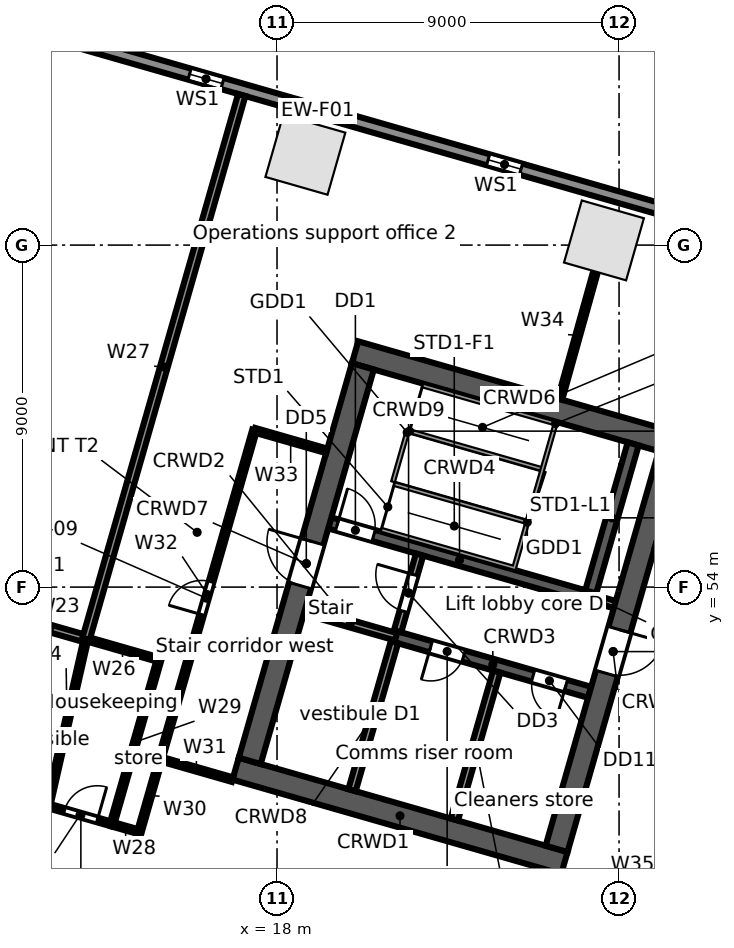
"""IFC4 building model, lengths in metres.
Left out: names, types, materials, properties, quantities, classifications, styles, units other than length and angle.
Written with IfcOpenShell. Run it as: python <this file> out.ifc"""

import sys

from ifc_helpers import new_model, si_unit, direction, frame, frame_2d, origin, origin_2d, place, context, subcontext, project, spatial, rectangle, extrude, element, fill, save


model = new_model("IFC4")
c1 = context("Model", 3, precision=1e-05, world=origin(), true_north=direction((0.0, 1.0)))
c2 = subcontext(c1, "Body", "Model", "MODEL_VIEW")
j1 = project(units=[si_unit("LENGTHUNIT", "METRE"), si_unit("PLANEANGLEUNIT", "RADIAN")], contexts=[c1])
p1 = place(None, origin())
s1 = spatial("IfcSite", under=j1, at=p1, CompositionType="ELEMENT")
p2 = place(p1, origin())
s2 = spatial("IfcBuilding", under=s1, at=p2, CompositionType="ELEMENT")
p3 = place(p2, frame((0.0, 0.0, 66.5)))
s3 = spatial("IfcBuildingStorey", under=s2, at=p3, CompositionType="ELEMENT", Elevation=66.5)
for number, where, z_axis, x_axis in (
    (1, (26.603, 63.124, 0.0), (0.0, 0.0, 1.0), (-0.961, 0.276, 0.0)),
    (2, (18.746, 65.376, 0.0), (0.0, 0.0, 1.0), (-0.961, 0.276, 0.0)),
):
    element("IfcColumn", number, at=place(p3, frame(where, z_axis=z_axis, x_axis=x_axis)), inside=s3, PredefinedType="COLUMN", context=c2, shape_type="SweptSolid", body=[
        extrude(rectangle(XDim=1.7, YDim=1.7, at=origin_2d()), origin(), (0.0, 0.0, 1.0), 5.0),
    ])
p4 = place(p3, frame((3.335, 71.044, 0.0), z_axis=(0.0, 0.0, 1.0), x_axis=(0.961260130989, -0.275642813387, 0.0)))
e3 = element("IfcWall", 3, at=p4, inside=s3, PredefinedType="STANDARD", context=c2, shape_type="SweptSolid", body=[
    extrude(rectangle(XDim=32.741, YDim=0.3, at=frame_2d((16.371, 0.0))), origin(), (0.0, 0.0, 1.0), 4.68),
])
p5 = place(p4, frame((29.207, 0.0, 0.6)))
e4 = element("IfcOpeningElement", 4, at=p5, cuts=e3, PredefinedType="OPENING", context=c2, shape_type="SweptSolid", body=[
    extrude(rectangle(XDim=0.9, YDim=3.2, at=frame_2d((0.45, 1.6))), frame((0.0, 0.16, 0.0), z_axis=(0.0, -1.0, 0.0), x_axis=(1.0, 0.0, 0.0)), (0.0, 0.0, 1.0), 0.32),
])
p6 = place(p4, frame((21.034, 0.0, 0.6)))
e5 = element("IfcOpeningElement", 5, at=p6, cuts=e3, PredefinedType="OPENING", context=c2, shape_type="SweptSolid", body=[
    extrude(rectangle(XDim=0.9, YDim=3.2, at=frame_2d((0.45, 1.6))), frame((0.0, 0.16, 0.0), z_axis=(0.0, -1.0, 0.0), x_axis=(1.0, 0.0, 0.0)), (0.0, 0.0, 1.0), 0.32),
])
p7 = place(p4, frame((12.861, 0.0, 0.6)))
e6 = element("IfcOpeningElement", 6, at=p7, cuts=e3, PredefinedType="OPENING", context=c2, shape_type="SweptSolid", body=[
    extrude(rectangle(XDim=0.9, YDim=3.2, at=frame_2d((0.45, 1.6))), frame((0.0, 0.16, 0.0), z_axis=(0.0, -1.0, 0.0), x_axis=(1.0, 0.0, 0.0)), (0.0, 0.0, 1.0), 0.32),
])
p8 = place(p4, frame((4.688, 0.0, 0.6)))
e7 = element("IfcOpeningElement", 7, at=p8, cuts=e3, PredefinedType="OPENING", context=c2, shape_type="SweptSolid", body=[
    extrude(rectangle(XDim=0.9, YDim=3.2, at=frame_2d((0.45, 1.6))), frame((0.0, 0.16, 0.0), z_axis=(0.0, -1.0, 0.0), x_axis=(1.0, 0.0, 0.0)), (0.0, 0.0, 1.0), 0.32),
])
p9 = place(p3, frame((25.398, 40.717, 0.0), z_axis=(0.0, 0.0, 1.0), x_axis=(-0.961262423262, 0.275634819324, 0.0)))
e8 = element("IfcWall", 8, at=p9, inside=s3, PredefinedType="STANDARD", context=c2, shape_type="SweptSolid", body=[
    extrude(rectangle(XDim=26.359, YDim=0.3, at=frame_2d((13.179, 0.0))), origin(), (0.0, 0.0, 1.0), 4.68),
])
p10 = place(p9, frame((22.664, 0.0, 0.6)))
e9 = element("IfcOpeningElement", 9, at=p10, cuts=e8, PredefinedType="OPENING", context=c2, shape_type="SweptSolid", body=[
    extrude(rectangle(XDim=0.9, YDim=3.2, at=frame_2d((0.45, 1.6))), frame((0.0, 0.16, 0.0), z_axis=(0.0, -1.0, 0.0), x_axis=(1.0, 0.0, 0.0)), (0.0, 0.0, 1.0), 0.32),
])
p11 = place(p9, frame((13.844, 0.0, 0.6)))
e10 = element("IfcOpeningElement", 10, at=p11, cuts=e8, PredefinedType="OPENING", context=c2, shape_type="SweptSolid", body=[
    extrude(rectangle(XDim=0.9, YDim=3.2, at=frame_2d((0.45, 1.6))), frame((0.0, 0.16, 0.0), z_axis=(0.0, -1.0, 0.0), x_axis=(1.0, 0.0, 0.0)), (0.0, 0.0, 1.0), 0.32),
])
p12 = place(p9, frame((5.023, 0.0, 0.6)))
e11 = element("IfcOpeningElement", 11, at=p12, cuts=e8, PredefinedType="OPENING", context=c2, shape_type="SweptSolid", body=[
    extrude(rectangle(XDim=0.9, YDim=3.2, at=frame_2d((0.45, 1.6))), frame((0.0, 0.16, 0.0), z_axis=(0.0, -1.0, 0.0), x_axis=(1.0, 0.0, 0.0)), (0.0, 0.0, 1.0), 0.32),
])
p13 = place(p3, frame((16.911, 49.221, 0.0), z_axis=(0.0, 0.0, 1.0), x_axis=(0.96126248289, -0.275634611374, 0.0)))
e12 = element("IfcWall", 12, at=p13, inside=s3, PredefinedType="SOLIDWALL", context=c2, shape_type="SweptSolid", body=[
    extrude(rectangle(XDim=9.0, YDim=0.6, at=frame_2d((4.5, 0.0))), origin(), (0.0, 0.0, 1.0), 4.68),
])
p14 = place(p3, frame((18.728, 53.382, 0.0), z_axis=(0.0, 0.0, 1.0), x_axis=(0.961247070632, -0.275688355216, 0.0)))
e13 = element("IfcWall", 13, at=p14, inside=s3, PredefinedType="SOLIDWALL", context=c2, shape_type="SweptSolid", body=[
    extrude(rectangle(XDim=2.5, YDim=0.2, at=frame_2d((1.25, 0.0))), origin(), (0.0, 0.0, 1.0), 4.68),
])
p15 = place(p3, frame((21.131, 52.692, 0.0), z_axis=(0.0, 0.0, 1.0), x_axis=(0.961271492568, -0.275603188616, 0.0)))
e14 = element("IfcWall", 14, at=p15, inside=s3, PredefinedType="SOLIDWALL", context=c2, shape_type="SweptSolid", body=[
    extrude(rectangle(XDim=5.3, YDim=0.3, at=frame_2d((2.65, 0.0))), origin(), (0.0, 0.0, 1.0), 4.68),
])
p16 = place(p15, frame((0.95, 0.0, 0.0)))
e15 = element("IfcOpeningElement", 15, at=p16, cuts=e14, PredefinedType="OPENING", context=c2, shape_type="SweptSolid", body=[
    extrude(rectangle(XDim=0.9, YDim=2.1, at=frame_2d((0.45, 1.05))), frame((0.0, 0.16, 0.0), z_axis=(0.0, -1.0, 0.0), x_axis=(1.0, 0.0, 0.0)), (0.0, 0.0, 1.0), 0.32),
])
p17 = place(p15, frame((3.75, 0.0, 0.0)))
e16 = element("IfcOpeningElement", 16, at=p17, cuts=e14, PredefinedType="OPENING", context=c2, shape_type="SweptSolid", body=[
    extrude(rectangle(XDim=0.9, YDim=2.1, at=frame_2d((0.45, 1.05))), frame((0.0, 0.16, 0.0), z_axis=(0.0, -1.0, 0.0), x_axis=(1.0, 0.0, 0.0)), (0.0, 0.0, 1.0), 0.32),
])
p18 = place(p3, frame((19.389, 55.689, 0.0), z_axis=(0.0, 0.0, 1.0), x_axis=(0.961261397636, -0.275638396117, 0.0)))
e17 = element("IfcWall", 17, at=p18, inside=s3, PredefinedType="SOLIDWALL", context=c2, shape_type="SweptSolid", body=[
    extrude(rectangle(XDim=7.1, YDim=0.3, at=frame_2d((3.55, 0.0))), origin(), (0.0, 0.0, 1.0), 4.68),
])
p19 = place(p18, frame((0.2, 0.0, 0.0)))
e18 = element("IfcOpeningElement", 18, at=p19, cuts=e17, PredefinedType="OPENING", context=c2, shape_type="SweptSolid", body=[
    extrude(rectangle(XDim=1.0, YDim=2.1, at=frame_2d((0.5, 1.05))), frame((0.0, 0.16, 0.0), z_axis=(0.0, -1.0, 0.0), x_axis=(1.0, 0.0, 0.0)), (0.0, 0.0, 1.0), 0.32),
])
p20 = place(p3, frame((26.214, 53.732, 0.0), z_axis=(0.0, 0.0, 1.0), x_axis=(0.96122076476, -0.27578005982, 0.0)))
e19 = element("IfcWall", 19, at=p20, inside=s3, PredefinedType="SOLIDWALL", context=c2, shape_type="SweptSolid", body=[
    extrude(rectangle(XDim=0.7, YDim=0.2, at=frame_2d((0.35, 0.0))), origin(), (0.0, 0.0, 1.0), 4.68),
])
p21 = place(p3, frame((20.053, 60.18, 0.0), z_axis=(0.0, 0.0, 1.0), x_axis=(0.96126248289, -0.275634611374, 0.0)))
e20 = element("IfcWall", 20, at=p21, inside=s3, PredefinedType="SOLIDWALL", context=c2, shape_type="SweptSolid", body=[
    extrude(rectangle(XDim=9.0, YDim=0.6, at=frame_2d((4.5, 0.0))), origin(), (0.0, 0.0, 1.0), 4.68),
])
p22 = place(p3, frame((17.282, 49.427, 0.0), z_axis=(0.0, 0.0, 1.0), x_axis=(0.275631631629, 0.961263337304, 0.0)))
e21 = element("IfcWall", 21, at=p22, inside=s3, PredefinedType="SOLIDWALL", context=c2, shape_type="SweptSolid", body=[
    extrude(rectangle(XDim=10.8, YDim=0.6, at=frame_2d((5.4, 0.0))), origin(), (0.0, 0.0, 1.0), 4.68),
])
p23 = place(p22, frame((4.8, 0.0, 0.0)))
e22 = element("IfcOpeningElement", 22, at=p23, cuts=e21, PredefinedType="OPENING", context=c2, shape_type="SweptSolid", body=[
    extrude(rectangle(XDim=1.2, YDim=2.1, at=frame_2d((0.6, 1.05))), frame((0.0, 0.31, 0.0), z_axis=(0.0, -1.0, 0.0), x_axis=(1.0, 0.0, 0.0)), (0.0, 0.0, 1.0), 0.62),
])
p24 = place(p3, frame((19.973, 48.655, 0.0), z_axis=(0.0, 0.0, 1.0), x_axis=(0.275668441653, 0.961252781674, 0.0)))
e23 = element("IfcWall", 23, at=p24, inside=s3, PredefinedType="SOLIDWALL", context=c2, shape_type="SweptSolid", body=[
    extrude(rectangle(XDim=4.05, YDim=0.2, at=frame_2d((2.025, 0.0))), origin(), (0.0, 0.0, 1.0), 4.68),
])
p25 = place(p3, frame((21.172, 52.837, 0.0), z_axis=(0.0, 0.0, 1.0), x_axis=(0.275657676022, 0.961255868981, 0.0)))
e24 = element("IfcWall", 24, at=p25, inside=s3, PredefinedType="PARTITIONING", context=c2, shape_type="SweptSolid", body=[
    extrude(rectangle(XDim=2.1, YDim=0.2, at=frame_2d((1.05, 0.0))), origin(), (0.0, 0.0, 1.0), 4.68),
])
p26 = place(p25, frame((0.55, 0.0, 0.0)))
e25 = element("IfcOpeningElement", 25, at=p26, cuts=e24, PredefinedType="OPENING", context=c2, shape_type="SweptSolid", body=[
    extrude(rectangle(XDim=1.0, YDim=2.1, at=frame_2d((0.5, 1.05))), frame((0.0, 0.11, 0.0), z_axis=(0.0, -1.0, 0.0), x_axis=(1.0, 0.0, 0.0)), (0.0, 0.0, 1.0), 0.22),
])
p27 = place(p3, frame((22.665, 47.883, 0.0), z_axis=(0.0, 0.0, 1.0), x_axis=(0.275596769212, 0.961273333033, 0.0)))
e26 = element("IfcWall", 26, at=p27, inside=s3, PredefinedType="PARTITIONING", context=c2, shape_type="SweptSolid", body=[
    extrude(rectangle(XDim=4.05, YDim=0.2, at=frame_2d((2.025, 0.0))), origin(), (0.0, 0.0, 1.0), 4.68),
])
p28 = place(p3, frame((26.256, 53.876, 0.0), z_axis=(0.0, 0.0, 1.0), x_axis=(0.275612739511, 0.961268754209, 0.0)))
e27 = element("IfcWall", 27, at=p28, inside=s3, PredefinedType="SOLIDWALL", context=c2, shape_type="SweptSolid", body=[
    extrude(rectangle(XDim=4.05, YDim=0.3, at=frame_2d((2.025, 0.0))), origin(), (0.0, 0.0, 1.0), 4.68),
])
p29 = place(p3, frame((25.356, 47.112, 0.0), z_axis=(0.0, 0.0, 1.0), x_axis=(0.275631631629, 0.961263337304, 0.0)))
e28 = element("IfcWall", 28, at=p29, inside=s3, PredefinedType="SOLIDWALL", context=c2, shape_type="SweptSolid", body=[
    extrude(rectangle(XDim=10.8, YDim=0.6, at=frame_2d((5.4, 0.0))), origin(), (0.0, 0.0, 1.0), 4.68),
])
p30 = place(p29, frame((4.8, 0.0, 0.0)))
e29 = element("IfcOpeningElement", 29, at=p30, cuts=e28, PredefinedType="OPENING", context=c2, shape_type="SweptSolid", body=[
    extrude(rectangle(XDim=1.2, YDim=2.1, at=frame_2d((0.6, 1.05))), frame((0.0, 0.31, 0.0), z_axis=(0.0, -1.0, 0.0), x_axis=(1.0, 0.0, 0.0)), (0.0, 0.0, 1.0), 0.62),
])
p31 = place(p3, frame((11.051, 53.19, 0.0), z_axis=(0.0, 0.0, 1.0), x_axis=(0.961316434736, -0.275446387355, 0.0)))
e30 = element("IfcWall", 30, at=p31, inside=s3, PredefinedType="PARTITIONING", context=c2, shape_type="SweptSolid", body=[
    extrude(rectangle(XDim=2.0, YDim=0.2, at=frame_2d((1.0, 0.0))), origin(), (0.0, 0.0, 1.0), 4.68),
])
p32 = place(p3, frame((11.973, 48.244, 0.0), z_axis=(0.0, 0.0, 1.0), x_axis=(0.222117362571, 0.975019936845, 0.0)))
e31 = element("IfcWall", 31, at=p32, inside=s3, PredefinedType="PARTITIONING", context=c2, shape_type="SweptSolid", body=[
    extrude(rectangle(XDim=4.508, YDim=0.125, at=frame_2d((2.254, 0.0))), origin(), (0.0, 0.0, 1.0), 4.68),
])
p33 = place(p3, frame((11.973, 48.244, 0.0), z_axis=(0.0, 0.0, 1.0), x_axis=(0.96136592135, -0.275273618907, 0.0)))
e32 = element("IfcWall", 32, at=p33, inside=s3, PredefinedType="PARTITIONING", context=c2, shape_type="SweptSolid", body=[
    extrude(rectangle(XDim=1.751, YDim=0.125, at=frame_2d((0.875, 0.0))), origin(), (0.0, 0.0, 1.0), 4.68),
])
p34 = place(p33, frame((0.45, 0.0, 0.0)))
e33 = element("IfcOpeningElement", 33, at=p34, cuts=e32, PredefinedType="OPENING", context=c2, shape_type="SweptSolid", body=[
    extrude(rectangle(XDim=0.9, YDim=2.1, at=frame_2d((0.45, 1.05))), frame((0.0, 0.073, 0.0), z_axis=(0.0, -1.0, 0.0), x_axis=(1.0, 0.0, 0.0)), (0.0, 0.0, 1.0), 0.145),
])
p35 = place(p3, frame((12.974, 52.639, 0.0), z_axis=(0.0, 0.0, 1.0), x_axis=(0.961270097305, -0.275608055084, 0.0)))
e34 = element("IfcWall", 34, at=p35, inside=s3, PredefinedType="PARTITIONING", context=c2, shape_type="SweptSolid", body=[
    extrude(rectangle(XDim=1.999, YDim=0.125, at=frame_2d((1.0, 0.0))), origin(), (0.0, 0.0, 1.0), 4.68),
])
p36 = place(p3, frame((12.974, 52.639, 0.0), z_axis=(0.0, 0.0, 1.0), x_axis=(0.275299463768, 0.961358520662, 0.0)))
e35 = element("IfcWall", 35, at=p36, inside=s3, PredefinedType="PARTITIONING", context=c2, shape_type="SweptSolid", body=[
    extrude(rectangle(XDim=14.885, YDim=0.2, at=frame_2d((7.443, 0.0))), origin(), (0.0, 0.0, 1.0), 3.742),
])
p37 = place(p3, frame((13.656, 47.762, 0.0), z_axis=(0.0, 0.0, 1.0), x_axis=(0.961154610169, -0.276010534854, 0.0)))
e36 = element("IfcWall", 36, at=p37, inside=s3, PredefinedType="PARTITIONING", context=c2, shape_type="SweptSolid", body=[
    extrude(rectangle(XDim=0.75, YDim=0.125, at=frame_2d((0.375, 0.0))), origin(), (0.0, 0.0, 1.0), 4.68),
])
p38 = place(p3, frame((13.656, 47.762, 0.0), z_axis=(0.0, 0.0, 1.0), x_axis=(0.275545040649, 0.96128816209, 0.0)))
e37 = element("IfcWall", 37, at=p38, inside=s3, PredefinedType="PARTITIONING", context=c2, shape_type="SweptSolid", body=[
    extrude(rectangle(XDim=4.5, YDim=0.125, at=frame_2d((2.25, 0.0))), origin(), (0.0, 0.0, 1.0), 4.68),
])
p39 = place(p3, frame((14.377, 47.555, 0.0), z_axis=(0.0, 0.0, 1.0), x_axis=(0.275446387355, 0.961316434736, 0.0)))
e38 = element("IfcWall", 38, at=p39, inside=s3, PredefinedType="PARTITIONING", context=c2, shape_type="SweptSolid", body=[
    extrude(rectangle(XDim=2.0, YDim=0.125, at=frame_2d((1.0, 0.0))), origin(), (0.0, 0.0, 1.0), 4.68),
])
p40 = place(p3, frame((14.928, 49.478, 0.0), z_axis=(0.0, 0.0, 1.0), x_axis=(0.961243778232, -0.27569983462, 0.0)))
e39 = element("IfcWall", 39, at=p40, inside=s3, PredefinedType="PARTITIONING", context=c2, shape_type="SweptSolid", body=[
    extrude(rectangle(XDim=1.977, YDim=0.125, at=frame_2d((0.988, 0.0))), origin(), (0.0, 0.0, 1.0), 4.68),
])
p41 = place(p3, frame((14.928, 49.478, 0.0), z_axis=(0.0, 0.0, 1.0), x_axis=(0.275674053528, 0.961251172281, 0.0)))
e40 = element("IfcWall", 40, at=p41, inside=s3, PredefinedType="PARTITIONING", context=c2, shape_type="SweptSolid", body=[
    extrude(rectangle(XDim=9.0, YDim=0.125, at=frame_2d((4.5, 0.0))), origin(), (0.0, 0.0, 1.0), 3.742),
])
p42 = place(p41, frame((3.95, 0.0, 0.0)))
e41 = element("IfcOpeningElement", 41, at=p42, cuts=e40, PredefinedType="OPENING", context=c2, shape_type="SweptSolid", body=[
    extrude(rectangle(XDim=0.9, YDim=2.1, at=frame_2d((0.45, 1.05))), frame((0.0, 0.073, 0.0), z_axis=(0.0, -1.0, 0.0), x_axis=(1.0, 0.0, 0.0)), (0.0, 0.0, 1.0), 0.145),
])
p43 = place(p3, frame((17.409, 58.129, 0.0), z_axis=(0.0, 0.0, 1.0), x_axis=(0.961253165474, -0.275667103345, 0.0)))
e42 = element("IfcWall", 42, at=p43, inside=s3, PredefinedType="PARTITIONING", context=c2, shape_type="SweptSolid", body=[
    extrude(rectangle(XDim=1.977, YDim=0.125, at=frame_2d((0.988, 0.0))), origin(), (0.0, 0.0, 1.0), 4.68),
])
p44 = place(p3, frame((25.445, 58.946, 0.0), z_axis=(0.0, 0.0, 1.0), x_axis=(0.268850353538, 0.963181959654, 0.0)))
e43 = element("IfcWall", 43, at=p44, inside=s3, PredefinedType="PARTITIONING", context=c2, shape_type="SweptSolid", body=[
    extrude(rectangle(XDim=3.485, YDim=0.125, at=frame_2d((1.743, 0.0))), origin(), (0.0, 0.0, 1.0), 4.154),
])
p45 = place(p3, frame((26.456, 42.338, 0.0), z_axis=(0.0, 0.0, 1.0), x_axis=(0.52980027265, 0.848122438743, 0.0)))
e44 = element("IfcWall", 44, at=p45, inside=s3, PredefinedType="PARTITIONING", context=c2, shape_type="SweptSolid", body=[
    extrude(rectangle(XDim=6.076, YDim=0.25, at=frame_2d((3.038, 0.0))), origin(), (0.0, 0.0, 1.0), 4.68),
])
p46 = place(p45, frame((2.2, 0.0, 0.0)))
e45 = element("IfcOpeningElement", 45, at=p46, cuts=e44, PredefinedType="OPENING", context=c2, shape_type="SweptSolid", body=[
    extrude(rectangle(XDim=1.8, YDim=2.1, at=frame_2d((0.9, 1.05))), frame((0.0, 0.135, 0.0), z_axis=(0.0, -1.0, 0.0), x_axis=(1.0, 0.0, 0.0)), (0.0, 0.0, 1.0), 0.27),
])
p47 = place(p6, origin())
e46 = element("IfcWindow", 46, at=p47, inside=s3, PartitioningType="SINGLE_PANEL", PredefinedType="WINDOW", context=c2, shape_type="SweptSolid", body=[
    extrude(rectangle(XDim=0.9, YDim=3.2, at=frame_2d((0.45, 1.6))), frame((0.0, 0.03, 0.0), z_axis=(0.0, -1.0, 0.0), x_axis=(1.0, 0.0, 0.0)), (0.0, 0.0, 1.0), 0.06),
])
fill(e5, e46)
p48 = place(p7, origin())
e47 = element("IfcWindow", 47, at=p48, inside=s3, PartitioningType="SINGLE_PANEL", PredefinedType="WINDOW", context=c2, shape_type="SweptSolid", body=[
    extrude(rectangle(XDim=0.9, YDim=3.2, at=frame_2d((0.45, 1.6))), frame((0.0, 0.03, 0.0), z_axis=(0.0, -1.0, 0.0), x_axis=(1.0, 0.0, 0.0)), (0.0, 0.0, 1.0), 0.06),
])
fill(e6, e47)
p49 = place(p19, origin())
e48 = element("IfcDoor", 48, at=p49, inside=s3, OperationType="SINGLE_SWING_LEFT", PredefinedType="DOOR", context=c2, shape_type="SweptSolid", body=[
    extrude(rectangle(XDim=1.0, YDim=2.1, at=frame_2d((0.5, 1.05))), frame((0.0, 0.025, 0.0), z_axis=(0.0, -1.0, 0.0), x_axis=(1.0, 0.0, 0.0)), (0.0, 0.0, 1.0), 0.05),
])
fill(e18, e48)
p50 = place(p26, origin())
e49 = element("IfcDoor", 49, at=p50, inside=s3, OperationType="SINGLE_SWING_RIGHT", PredefinedType="DOOR", context=c2, shape_type="SweptSolid", body=[
    extrude(rectangle(XDim=1.0, YDim=2.1, at=frame_2d((0.5, 1.05))), frame((0.0, 0.025, 0.0), z_axis=(0.0, -1.0, 0.0), x_axis=(1.0, 0.0, 0.0)), (0.0, 0.0, 1.0), 0.05),
])
fill(e25, e49)
p51 = place(p23, origin())
e50 = element("IfcDoor", 50, at=p51, inside=s3, OperationType="SINGLE_SWING_RIGHT", PredefinedType="DOOR", context=c2, shape_type="SweptSolid", body=[
    extrude(rectangle(XDim=1.2, YDim=2.1, at=frame_2d((0.6, 1.05))), frame((0.0, 0.025, 0.0), z_axis=(0.0, -1.0, 0.0), x_axis=(1.0, 0.0, 0.0)), (0.0, 0.0, 1.0), 0.05),
])
fill(e22, e50)
p52 = place(p30, frame((1.2, 0.0, 0.0), z_axis=(0.0, 0.0, 1.0), x_axis=(-1.0, 0.0, 0.0)))
e51 = element("IfcDoor", 51, at=p52, inside=s3, OperationType="SINGLE_SWING_LEFT", PredefinedType="DOOR", context=c2, shape_type="SweptSolid", body=[
    extrude(rectangle(XDim=1.2, YDim=2.1, at=frame_2d((0.6, 1.05))), frame((0.0, 0.025, 0.0), z_axis=(0.0, -1.0, 0.0), x_axis=(1.0, 0.0, 0.0)), (0.0, 0.0, 1.0), 0.05),
])
fill(e29, e51)
p53 = place(p16, frame((0.9, 0.0, 0.0), z_axis=(0.0, 0.0, 1.0), x_axis=(-1.0, 0.0, 0.0)))
e52 = element("IfcDoor", 52, at=p53, inside=s3, OperationType="SINGLE_SWING_RIGHT", PredefinedType="DOOR", context=c2, shape_type="SweptSolid", body=[
    extrude(rectangle(XDim=0.9, YDim=2.1, at=frame_2d((0.45, 1.05))), frame((0.0, 0.025, 0.0), z_axis=(0.0, -1.0, 0.0), x_axis=(1.0, 0.0, 0.0)), (0.0, 0.0, 1.0), 0.05),
])
fill(e15, e52)
p54 = place(p17, frame((0.9, 0.0, 0.0), z_axis=(0.0, 0.0, 1.0), x_axis=(-1.0, 0.0, 0.0)))
e53 = element("IfcDoor", 53, at=p54, inside=s3, OperationType="SINGLE_SWING_LEFT", PredefinedType="DOOR", context=c2, shape_type="SweptSolid", body=[
    extrude(rectangle(XDim=0.9, YDim=2.1, at=frame_2d((0.45, 1.05))), frame((0.0, 0.025, 0.0), z_axis=(0.0, -1.0, 0.0), x_axis=(1.0, 0.0, 0.0)), (0.0, 0.0, 1.0), 0.05),
])
fill(e16, e53)
p55 = place(p34, origin())
e54 = element("IfcDoor", 54, at=p55, inside=s3, OperationType="SINGLE_SWING_RIGHT", PredefinedType="DOOR", context=c2, shape_type="SweptSolid", body=[
    extrude(rectangle(XDim=0.9, YDim=2.1, at=frame_2d((0.45, 1.05))), frame((0.0, 0.025, 0.0), z_axis=(0.0, -1.0, 0.0), x_axis=(1.0, 0.0, 0.0)), (0.0, 0.0, 1.0), 0.05),
])
fill(e33, e54)
p56 = place(p42, origin())
e55 = element("IfcDoor", 55, at=p56, inside=s3, OperationType="SINGLE_SWING_LEFT", PredefinedType="DOOR", context=c2, shape_type="SweptSolid", body=[
    extrude(rectangle(XDim=0.9, YDim=2.1, at=frame_2d((0.45, 1.05))), frame((0.0, 0.025, 0.0), z_axis=(0.0, -1.0, 0.0), x_axis=(1.0, 0.0, 0.0)), (0.0, 0.0, 1.0), 0.05),
])
fill(e41, e55)
save(model, sys.argv[1])
